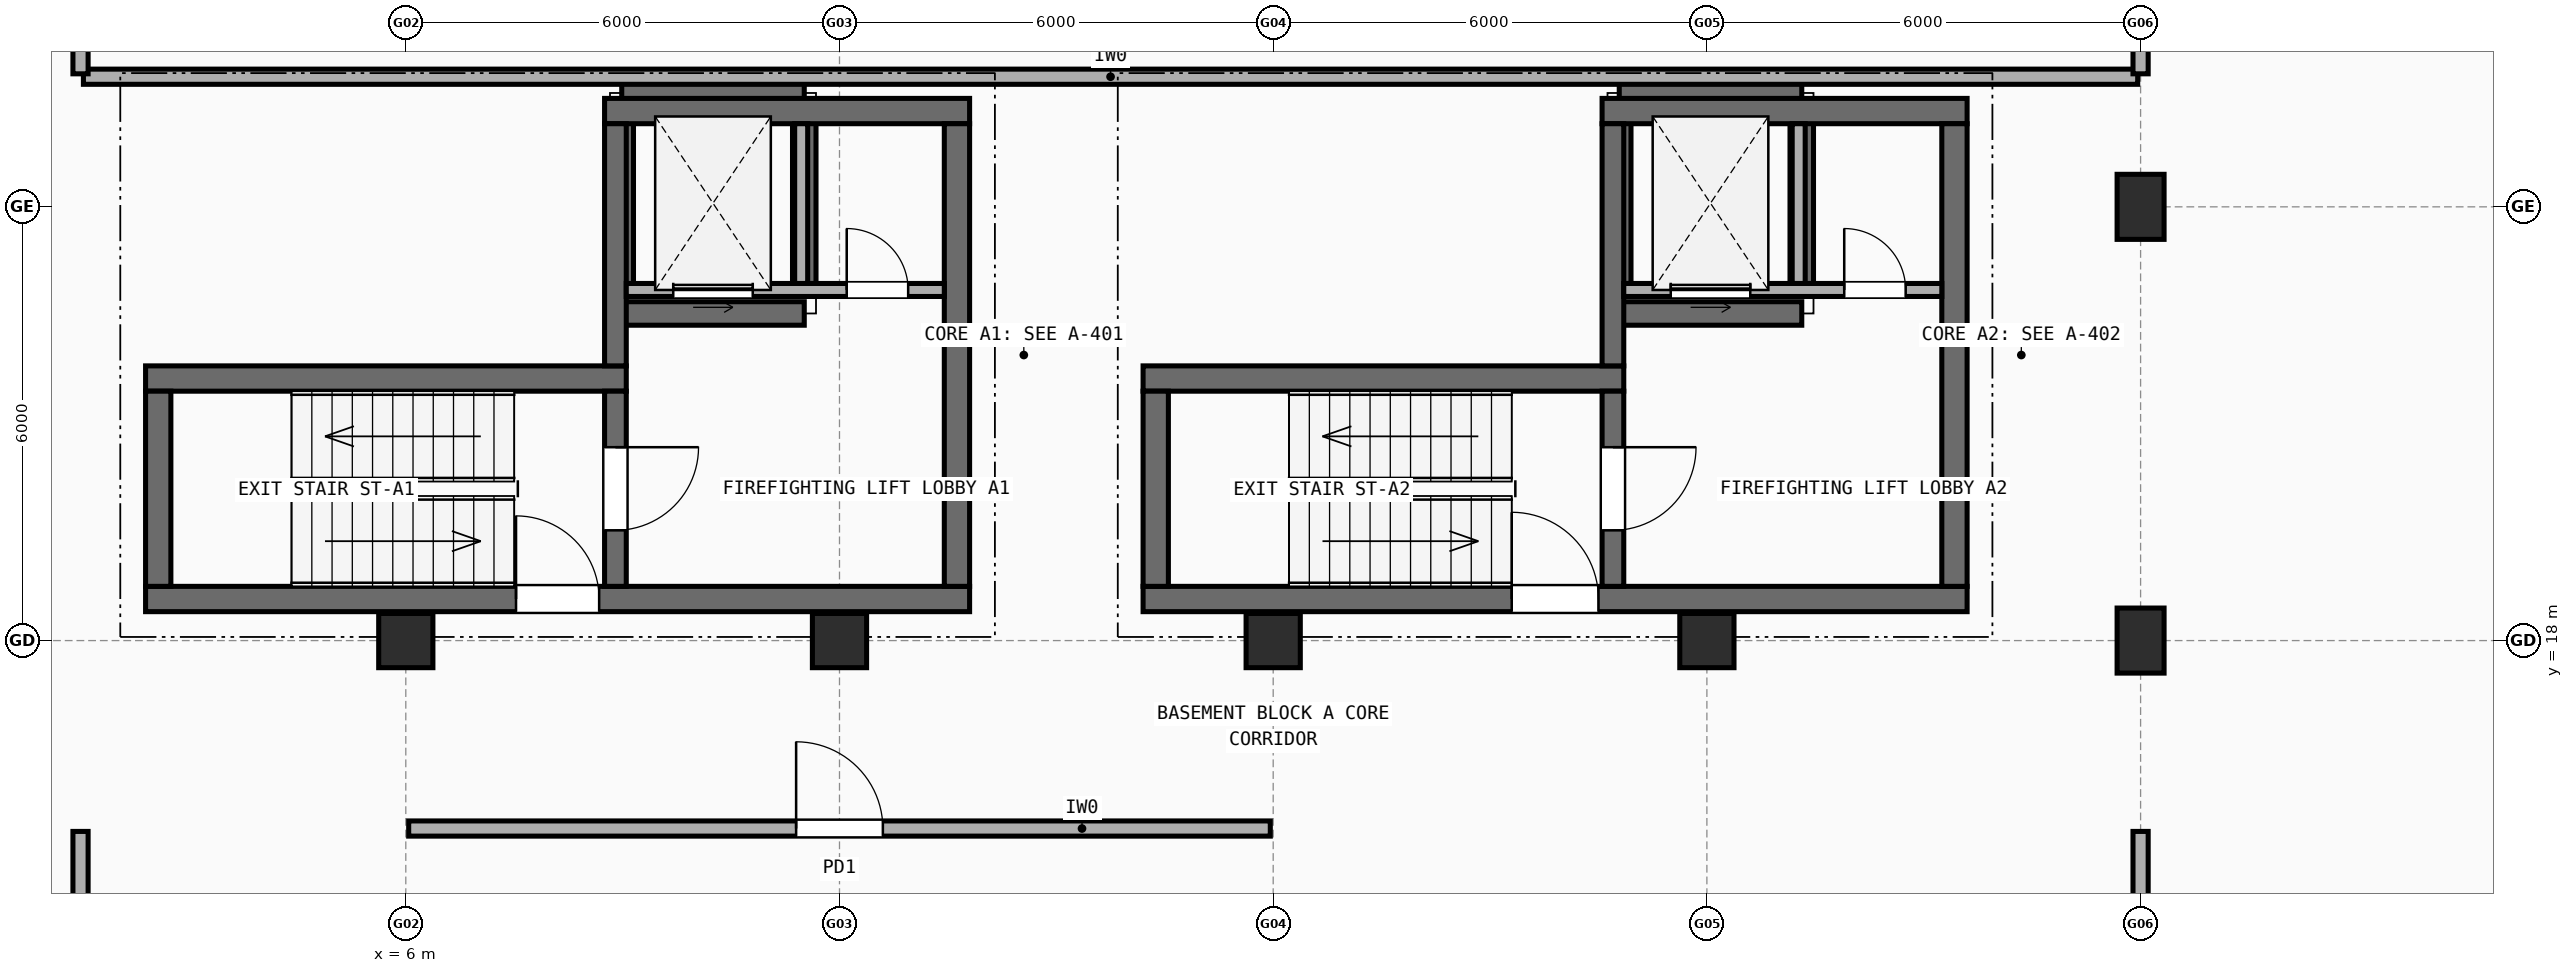
"""IFC4 building model, lengths in metres.
Left out: names, types, materials, properties, quantities, classifications, styles, units other than length and angle.
Written with IfcOpenShell. Run it as: python <this file> out.ifc"""

import sys

from ifc_helpers import new_model, si_unit, direction, frame, frame_2d, origin, origin_2d, place, context, subcontext, project, spatial, rectangle, extrude, element, fill, save


model = new_model("IFC4")
c1 = context("Model", 3, precision=1e-05, world=origin(), true_north=direction((0.0, 1.0)))
c2 = subcontext(c1, "Body", "Model", "MODEL_VIEW")
j1 = project(units=[si_unit("LENGTHUNIT", "METRE"), si_unit("PLANEANGLEUNIT", "RADIAN")], contexts=[c1])
p1 = place(None, origin())
s1 = spatial("IfcSite", under=j1, at=p1, CompositionType="ELEMENT")
p2 = place(p1, origin())
s2 = spatial("IfcBuilding", under=s1, at=p2, CompositionType="ELEMENT")
p3 = place(p2, frame((0.0, 0.0, -4.5)))
s3 = spatial("IfcBuildingStorey", under=s2, at=p3, CompositionType="ELEMENT", Elevation=-4.5)
p4 = place(p3, frame((8.988, 22.525, -1.1), z_axis=(0.0, 0.0, 1.0), x_axis=(1.0, 0.0, 0.0)))
e1 = element("IfcWall", 1, at=p4, inside=s3, PredefinedType="SHEAR", context=c2, shape_type="SweptSolid", body=[
    extrude(rectangle(XDim=2.525, YDim=0.325, at=frame_2d((1.262, 0.0))), origin(), (0.0, 0.0, 1.0), 1.1),
])
p5 = place(p3, frame((11.512, 22.85, -1.1), z_axis=(0.0, 0.0, 1.0), x_axis=(0.0, 1.0, 0.0)))
e2 = element("IfcWall", 2, at=p5, inside=s3, PredefinedType="SHEAR", context=c2, shape_type="SweptSolid", body=[
    extrude(rectangle(XDim=2.4, YDim=0.325, at=frame_2d((1.2, 0.0))), origin(), (0.0, 0.0, 1.0), 1.1),
])
p6 = place(p3, frame((11.512, 25.575, -1.1), z_axis=(0.0, 0.0, 1.0), x_axis=(-1.0, 0.0, 0.0)))
e3 = element("IfcWall", 3, at=p6, inside=s3, PredefinedType="SHEAR", context=c2, shape_type="SweptSolid", body=[
    extrude(rectangle(XDim=2.525, YDim=0.325, at=frame_2d((1.262, 0.0))), origin(), (0.0, 0.0, 1.0), 1.1),
])
p7 = place(p3, frame((8.988, 25.25, -1.1), z_axis=(0.0, 0.0, 1.0), x_axis=(0.0, -1.0, 0.0)))
e4 = element("IfcWall", 4, at=p7, inside=s3, PredefinedType="SHEAR", context=c2, shape_type="SweptSolid", body=[
    extrude(rectangle(XDim=2.4, YDim=0.325, at=frame_2d((1.2, 0.0))), origin(), (0.0, 0.0, 1.0), 1.1),
])
p8 = place(p3, frame((22.788, 22.525, -1.1), z_axis=(0.0, 0.0, 1.0), x_axis=(1.0, 0.0, 0.0)))
e5 = element("IfcWall", 5, at=p8, inside=s3, PredefinedType="SHEAR", context=c2, shape_type="SweptSolid", body=[
    extrude(rectangle(XDim=2.525, YDim=0.325, at=frame_2d((1.262, 0.0))), origin(), (0.0, 0.0, 1.0), 1.1),
])
p9 = place(p3, frame((25.312, 22.85, -1.1), z_axis=(0.0, 0.0, 1.0), x_axis=(0.0, 1.0, 0.0)))
e6 = element("IfcWall", 6, at=p9, inside=s3, PredefinedType="SHEAR", context=c2, shape_type="SweptSolid", body=[
    extrude(rectangle(XDim=2.4, YDim=0.325, at=frame_2d((1.2, 0.0))), origin(), (0.0, 0.0, 1.0), 1.1),
])
p10 = place(p3, frame((25.312, 25.575, -1.1), z_axis=(0.0, 0.0, 1.0), x_axis=(-1.0, 0.0, 0.0)))
e7 = element("IfcWall", 7, at=p10, inside=s3, PredefinedType="SHEAR", context=c2, shape_type="SweptSolid", body=[
    extrude(rectangle(XDim=2.525, YDim=0.325, at=frame_2d((1.262, 0.0))), origin(), (0.0, 0.0, 1.0), 1.1),
])
p11 = place(p3, frame((22.788, 25.25, -1.1), z_axis=(0.0, 0.0, 1.0), x_axis=(0.0, -1.0, 0.0)))
e8 = element("IfcWall", 8, at=p11, inside=s3, PredefinedType="SHEAR", context=c2, shape_type="SweptSolid", body=[
    extrude(rectangle(XDim=2.4, YDim=0.325, at=frame_2d((1.2, 0.0))), origin(), (0.0, 0.0, 1.0), 1.1),
])
for number, where, z_axis, x_axis in (
    (9, (6.0, 18.0, 0.0), (0.0, 0.0, 1.0), (1.0, 0.0, 0.0)),
    (10, (12.0, 18.0, 0.0), (0.0, 0.0, 1.0), (1.0, 0.0, 0.0)),
    (11, (18.0, 18.0, 0.0), (0.0, 0.0, 1.0), (1.0, 0.0, 0.0)),
    (12, (24.0, 18.0, 0.0), (0.0, 0.0, 1.0), (1.0, 0.0, 0.0)),
):
    element("IfcColumn", number, at=place(p3, frame(where, z_axis=z_axis, x_axis=x_axis)), inside=s3, PredefinedType="COLUMN", context=c2, shape_type="SweptSolid", body=[
        extrude(rectangle(XDim=0.75, YDim=0.75, at=origin_2d()), origin(), (0.0, 0.0, 1.0), 4.215),
    ])
for number, where, z_axis, x_axis in (
    (13, (30.0, 18.0, 0.0), (0.0, 0.0, 1.0), (1.0, 0.0, 0.0)),
    (14, (30.0, 24.0, 0.0), (0.0, 0.0, 1.0), (1.0, 0.0, 0.0)),
):
    element("IfcColumn", number, at=place(p3, frame(where, z_axis=z_axis, x_axis=x_axis)), inside=s3, PredefinedType="COLUMN", context=c2, shape_type="SweptSolid", body=[
        extrude(rectangle(XDim=0.65, YDim=0.9, at=origin_2d()), origin(), (0.0, 0.0, 1.0), 4.215),
    ])
p12 = place(p3, frame((2.4, 18.575, 0.0), z_axis=(0.0, 0.0, 1.0), x_axis=(1.0, 0.0, 0.0)))
e15 = element("IfcWall", 15, at=p12, inside=s3, PredefinedType="SHEAR", context=c2, shape_type="SweptSolid", body=[
    extrude(rectangle(XDim=11.4, YDim=0.35, at=frame_2d((5.7, 0.0))), origin(), (0.0, 0.0, 1.0), 4.215),
])
p13 = place(p12, frame((5.125, 0.0, 0.0)))
e16 = element("IfcOpeningElement", 16, at=p13, cuts=e15, PredefinedType="OPENING", context=c2, shape_type="SweptSolid", body=[
    extrude(rectangle(XDim=1.15, YDim=2.15, at=frame_2d((0.575, 1.075))), frame((0.0, 0.185, 0.0), z_axis=(0.0, -1.0, 0.0), x_axis=(1.0, 0.0, 0.0)), (0.0, 0.0, 1.0), 0.37),
])
p14 = place(p3, frame((9.05, 21.625, 0.0), z_axis=(0.0, 0.0, 1.0), x_axis=(-1.0, 0.0, 0.0)))
e17 = element("IfcWall", 17, at=p14, inside=s3, PredefinedType="SHEAR", context=c2, shape_type="SweptSolid", body=[
    extrude(rectangle(XDim=6.65, YDim=0.35, at=frame_2d((3.325, 0.0))), origin(), (0.0, 0.0, 1.0), 4.215),
])
p15 = place(p3, frame((2.575, 21.45, 0.0), z_axis=(0.0, 0.0, 1.0), x_axis=(0.0, -1.0, 0.0)))
e18 = element("IfcWall", 18, at=p15, inside=s3, PredefinedType="SHEAR", context=c2, shape_type="SweptSolid", body=[
    extrude(rectangle(XDim=2.7, YDim=0.35, at=frame_2d((1.35, 0.0))), origin(), (0.0, 0.0, 1.0), 4.215),
])
p16 = place(p3, frame((8.9, 18.75, 0.0), z_axis=(0.0, 0.0, 1.0), x_axis=(0.0, 1.0, 0.0)))
e19 = element("IfcWall", 19, at=p16, inside=s3, PredefinedType="SHEAR", context=c2, shape_type="SweptSolid", body=[
    extrude(rectangle(XDim=2.7, YDim=0.3, at=frame_2d((1.35, 0.0))), origin(), (0.0, 0.0, 1.0), 4.215),
])
p17 = place(p16, frame((0.775, 0.0, 0.0)))
e20 = element("IfcOpeningElement", 20, at=p17, cuts=e19, PredefinedType="OPENING", context=c2, shape_type="SweptSolid", body=[
    extrude(rectangle(XDim=1.15, YDim=2.15, at=frame_2d((0.575, 1.075))), frame((0.0, 0.16, 0.0), z_axis=(0.0, -1.0, 0.0), x_axis=(1.0, 0.0, 0.0)), (0.0, 0.0, 1.0), 0.32),
])
p18 = place(p3, frame((13.8, 25.325, 0.0), z_axis=(0.0, 0.0, 1.0), x_axis=(-1.0, 0.0, 0.0)))
e21 = element("IfcWall", 21, at=p18, inside=s3, PredefinedType="SHEAR", context=c2, shape_type="SweptSolid", body=[
    extrude(rectangle(XDim=5.05, YDim=0.35, at=frame_2d((2.525, 0.0))), origin(), (0.0, 0.0, 1.0), 4.215),
])
p19 = place(p3, frame((13.625, 18.75, 0.0), z_axis=(0.0, 0.0, 1.0), x_axis=(0.0, 1.0, 0.0)))
e22 = element("IfcWall", 22, at=p19, inside=s3, PredefinedType="SHEAR", context=c2, shape_type="SweptSolid", body=[
    extrude(rectangle(XDim=6.4, YDim=0.35, at=frame_2d((3.2, 0.0))), origin(), (0.0, 0.0, 1.0), 4.215),
])
p20 = place(p3, frame((8.9, 21.8, 0.0), z_axis=(0.0, 0.0, 1.0), x_axis=(0.0, 1.0, 0.0)))
e23 = element("IfcWall", 23, at=p20, inside=s3, PredefinedType="SHEAR", context=c2, shape_type="SweptSolid", body=[
    extrude(rectangle(XDim=3.35, YDim=0.3, at=frame_2d((1.675, 0.0))), origin(), (0.0, 0.0, 1.0), 4.215),
])
p21 = place(p3, frame((9.05, 22.85, 0.0), z_axis=(0.0, 0.0, 1.0), x_axis=(1.0, 0.0, 0.0)))
e24 = element("IfcWall", 24, at=p21, inside=s3, PredefinedType="SOLIDWALL", context=c2, shape_type="SweptSolid", body=[
    extrude(rectangle(XDim=4.4, YDim=0.18, at=frame_2d((2.2, 0.0))), origin(), (0.0, 0.0, 1.0), 4.215),
])
p22 = place(p21, frame((0.65, 0.0, 0.0)))
e25 = element("IfcOpeningElement", 25, at=p22, cuts=e24, PredefinedType="OPENING", context=c2, shape_type="SweptSolid", body=[
    extrude(rectangle(XDim=1.1, YDim=2.15, at=frame_2d((0.55, 1.075))), frame((0.0, 0.1, 0.0), z_axis=(0.0, -1.0, 0.0), x_axis=(1.0, 0.0, 0.0)), (0.0, 0.0, 1.0), 0.2),
])
p23 = place(p21, frame((3.05, 0.0, 0.0)))
e26 = element("IfcOpeningElement", 26, at=p23, cuts=e24, PredefinedType="OPENING", context=c2, shape_type="SweptSolid", body=[
    extrude(rectangle(XDim=0.85, YDim=2.1, at=frame_2d((0.425, 1.05))), frame((0.0, 0.1, 0.0), z_axis=(0.0, -1.0, 0.0), x_axis=(1.0, 0.0, 0.0)), (0.0, 0.0, 1.0), 0.2),
])
p24 = place(p3, frame((11.47, 22.94, 0.0), z_axis=(0.0, 0.0, 1.0), x_axis=(0.0, 1.0, 0.0)))
e27 = element("IfcWall", 27, at=p24, inside=s3, PredefinedType="SOLIDWALL", context=c2, shape_type="SweptSolid", body=[
    extrude(rectangle(XDim=2.21, YDim=0.18, at=frame_2d((1.105, 0.0))), origin(), (0.0, 0.0, 1.0), 4.215),
])
p25 = place(p3, frame((16.2, 18.575, 0.0), z_axis=(0.0, 0.0, 1.0), x_axis=(1.0, 0.0, 0.0)))
e28 = element("IfcWall", 28, at=p25, inside=s3, PredefinedType="SHEAR", context=c2, shape_type="SweptSolid", body=[
    extrude(rectangle(XDim=11.4, YDim=0.35, at=frame_2d((5.7, 0.0))), origin(), (0.0, 0.0, 1.0), 4.215),
])
p26 = place(p25, frame((5.1, 0.0, 0.0)))
e29 = element("IfcOpeningElement", 29, at=p26, cuts=e28, PredefinedType="OPENING", context=c2, shape_type="SweptSolid", body=[
    extrude(rectangle(XDim=1.2, YDim=2.15, at=frame_2d((0.6, 1.075))), frame((0.0, 0.185, 0.0), z_axis=(0.0, -1.0, 0.0), x_axis=(1.0, 0.0, 0.0)), (0.0, 0.0, 1.0), 0.37),
])
p27 = place(p3, frame((22.85, 21.625, 0.0), z_axis=(0.0, 0.0, 1.0), x_axis=(-1.0, 0.0, 0.0)))
e30 = element("IfcWall", 30, at=p27, inside=s3, PredefinedType="SHEAR", context=c2, shape_type="SweptSolid", body=[
    extrude(rectangle(XDim=6.65, YDim=0.35, at=frame_2d((3.325, 0.0))), origin(), (0.0, 0.0, 1.0), 4.215),
])
p28 = place(p3, frame((16.375, 21.45, 0.0), z_axis=(0.0, 0.0, 1.0), x_axis=(0.0, -1.0, 0.0)))
e31 = element("IfcWall", 31, at=p28, inside=s3, PredefinedType="SHEAR", context=c2, shape_type="SweptSolid", body=[
    extrude(rectangle(XDim=2.7, YDim=0.35, at=frame_2d((1.35, 0.0))), origin(), (0.0, 0.0, 1.0), 4.215),
])
p29 = place(p3, frame((22.7, 18.75, 0.0), z_axis=(0.0, 0.0, 1.0), x_axis=(0.0, 1.0, 0.0)))
e32 = element("IfcWall", 32, at=p29, inside=s3, PredefinedType="SHEAR", context=c2, shape_type="SweptSolid", body=[
    extrude(rectangle(XDim=2.7, YDim=0.3, at=frame_2d((1.35, 0.0))), origin(), (0.0, 0.0, 1.0), 4.215),
])
p30 = place(p29, frame((0.775, 0.0, 0.0)))
e33 = element("IfcOpeningElement", 33, at=p30, cuts=e32, PredefinedType="OPENING", context=c2, shape_type="SweptSolid", body=[
    extrude(rectangle(XDim=1.15, YDim=2.15, at=frame_2d((0.575, 1.075))), frame((0.0, 0.16, 0.0), z_axis=(0.0, -1.0, 0.0), x_axis=(1.0, 0.0, 0.0)), (0.0, 0.0, 1.0), 0.32),
])
p31 = place(p3, frame((27.6, 25.325, 0.0), z_axis=(0.0, 0.0, 1.0), x_axis=(-1.0, 0.0, 0.0)))
e34 = element("IfcWall", 34, at=p31, inside=s3, PredefinedType="SHEAR", context=c2, shape_type="SweptSolid", body=[
    extrude(rectangle(XDim=5.05, YDim=0.35, at=frame_2d((2.525, 0.0))), origin(), (0.0, 0.0, 1.0), 4.215),
])
p32 = place(p3, frame((27.425, 18.75, 0.0), z_axis=(0.0, 0.0, 1.0), x_axis=(0.0, 1.0, 0.0)))
e35 = element("IfcWall", 35, at=p32, inside=s3, PredefinedType="SHEAR", context=c2, shape_type="SweptSolid", body=[
    extrude(rectangle(XDim=6.4, YDim=0.35, at=frame_2d((3.2, 0.0))), origin(), (0.0, 0.0, 1.0), 4.215),
])
p33 = place(p3, frame((22.7, 21.8, 0.0), z_axis=(0.0, 0.0, 1.0), x_axis=(0.0, 1.0, 0.0)))
e36 = element("IfcWall", 36, at=p33, inside=s3, PredefinedType="SHEAR", context=c2, shape_type="SweptSolid", body=[
    extrude(rectangle(XDim=3.35, YDim=0.3, at=frame_2d((1.675, 0.0))), origin(), (0.0, 0.0, 1.0), 4.215),
])
p34 = place(p3, frame((22.85, 22.85, 0.0), z_axis=(0.0, 0.0, 1.0), x_axis=(1.0, 0.0, 0.0)))
e37 = element("IfcWall", 37, at=p34, inside=s3, PredefinedType="SOLIDWALL", context=c2, shape_type="SweptSolid", body=[
    extrude(rectangle(XDim=4.4, YDim=0.18, at=frame_2d((2.2, 0.0))), origin(), (0.0, 0.0, 1.0), 4.215),
])
p35 = place(p34, frame((0.65, 0.0, 0.0)))
e38 = element("IfcOpeningElement", 38, at=p35, cuts=e37, PredefinedType="OPENING", context=c2, shape_type="SweptSolid", body=[
    extrude(rectangle(XDim=1.1, YDim=2.15, at=frame_2d((0.55, 1.075))), frame((0.0, 0.1, 0.0), z_axis=(0.0, -1.0, 0.0), x_axis=(1.0, 0.0, 0.0)), (0.0, 0.0, 1.0), 0.2),
])
p36 = place(p34, frame((3.05, 0.0, 0.0)))
e39 = element("IfcOpeningElement", 39, at=p36, cuts=e37, PredefinedType="OPENING", context=c2, shape_type="SweptSolid", body=[
    extrude(rectangle(XDim=0.85, YDim=2.1, at=frame_2d((0.425, 1.05))), frame((0.0, 0.1, 0.0), z_axis=(0.0, -1.0, 0.0), x_axis=(1.0, 0.0, 0.0)), (0.0, 0.0, 1.0), 0.2),
])
p37 = place(p3, frame((25.27, 22.94, 0.0), z_axis=(0.0, 0.0, 1.0), x_axis=(0.0, 1.0, 0.0)))
e40 = element("IfcWall", 40, at=p37, inside=s3, PredefinedType="SOLIDWALL", context=c2, shape_type="SweptSolid", body=[
    extrude(rectangle(XDim=2.21, YDim=0.18, at=frame_2d((1.105, 0.0))), origin(), (0.0, 0.0, 1.0), 4.215),
])
p38 = place(p3, frame((6.04, 15.4, 0.0), z_axis=(0.0, 0.0, 1.0), x_axis=(1.0, 0.0, 0.0)))
e41 = element("IfcWall", 41, at=p38, inside=s3, PredefinedType="SOLIDWALL", context=c2, shape_type="SweptSolid", body=[
    extrude(rectangle(XDim=11.92, YDim=0.21, at=frame_2d((5.96, 0.0))), origin(), (0.0, 0.0, 1.0), 3.497),
])
p39 = place(p38, frame((5.36, 0.0, 0.0)))
e42 = element("IfcOpeningElement", 42, at=p39, cuts=e41, PredefinedType="OPENING", context=c2, shape_type="SweptSolid", body=[
    extrude(rectangle(XDim=1.2, YDim=2.15, at=frame_2d((0.6, 1.075))), frame((0.0, 0.115, 0.0), z_axis=(0.0, -1.0, 0.0), x_axis=(1.0, 0.0, 0.0)), (0.0, 0.0, 1.0), 0.23),
])
p40 = place(p3, frame((30.0, 1.54, 0.0), z_axis=(0.0, 0.0, 1.0), x_axis=(0.0, 1.0, 0.0)))
e43 = element("IfcWall", 43, at=p40, inside=s3, PredefinedType="SOLIDWALL", context=c2, shape_type="SweptSolid", body=[
    extrude(rectangle(XDim=13.82, YDim=0.21, at=frame_2d((6.91, 0.0))), origin(), (0.0, 0.0, 1.0), 3.597),
])
p41 = place(p3, frame((1.5, 15.36, 0.0), z_axis=(0.0, 0.0, 1.0), x_axis=(0.0, -1.0, 0.0)))
e44 = element("IfcWall", 44, at=p41, inside=s3, PredefinedType="SOLIDWALL", context=c2, shape_type="SweptSolid", body=[
    extrude(rectangle(XDim=13.82, YDim=0.21, at=frame_2d((6.91, 0.0))), origin(), (0.0, 0.0, 1.0), 3.497),
])
p42 = place(p3, frame((1.54, 25.8, 0.0), z_axis=(0.0, 0.0, 1.0), x_axis=(1.0, 0.0, 0.0)))
e45 = element("IfcWall", 45, at=p42, inside=s3, PredefinedType="SOLIDWALL", context=c2, shape_type="SweptSolid", body=[
    extrude(rectangle(XDim=28.42, YDim=0.21, at=frame_2d((14.21, 0.0))), origin(), (0.0, 0.0, 1.0), 2.897),
])
p43 = place(p3, frame((30.0, 25.84, 0.0), z_axis=(0.0, 0.0, 1.0), x_axis=(0.0, 1.0, 0.0)))
e46 = element("IfcWall", 46, at=p43, inside=s3, PredefinedType="SOLIDWALL", context=c2, shape_type="SweptSolid", body=[
    extrude(rectangle(XDim=15.8, YDim=0.21, at=frame_2d((7.9, 0.0))), origin(), (0.0, 0.0, 1.0), 3.597),
])
p44 = place(p3, frame((1.5, 41.96, 0.0), z_axis=(0.0, 0.0, 1.0), x_axis=(0.0, -1.0, 0.0)))
e47 = element("IfcWall", 47, at=p44, inside=s3, PredefinedType="SOLIDWALL", context=c2, shape_type="SweptSolid", body=[
    extrude(rectangle(XDim=16.12, YDim=0.21, at=frame_2d((8.06, 0.0))), origin(), (0.0, 0.0, 1.0), 3.447),
])
p45 = place(p13, origin())
e48 = element("IfcDoor", 48, at=p45, inside=s3, OperationType="SINGLE_SWING_LEFT", PredefinedType="DOOR", context=c2, shape_type="SweptSolid", body=[
    extrude(rectangle(XDim=1.15, YDim=2.15, at=frame_2d((0.575, 1.075))), frame((0.0, 0.025, 0.0), z_axis=(0.0, -1.0, 0.0), x_axis=(1.0, 0.0, 0.0)), (0.0, 0.0, 1.0), 0.05),
])
fill(e16, e48)
p46 = place(p17, origin())
e49 = element("IfcDoor", 49, at=p46, inside=s3, OperationType="SINGLE_SWING_RIGHT", PredefinedType="DOOR", context=c2, shape_type="SweptSolid", body=[
    extrude(rectangle(XDim=1.15, YDim=2.15, at=frame_2d((0.575, 1.075))), frame((0.0, 0.025, 0.0), z_axis=(0.0, -1.0, 0.0), x_axis=(1.0, 0.0, 0.0)), (0.0, 0.0, 1.0), 0.05),
])
fill(e20, e49)
p47 = place(p22, origin())
e50 = element("IfcDoor", 50, at=p47, inside=s3, OperationType="SLIDING_TO_LEFT", PredefinedType="DOOR", context=c2, shape_type="SweptSolid", body=[
    extrude(rectangle(XDim=1.1, YDim=2.15, at=frame_2d((0.55, 1.075))), frame((0.0, 0.025, 0.0), z_axis=(0.0, -1.0, 0.0), x_axis=(1.0, 0.0, 0.0)), (0.0, 0.0, 1.0), 0.05),
])
fill(e25, e50)
p48 = place(p23, frame((0.85, 0.0, 0.0), z_axis=(0.0, 0.0, 1.0), x_axis=(-1.0, 0.0, 0.0)))
e51 = element("IfcDoor", 51, at=p48, inside=s3, OperationType="SINGLE_SWING_LEFT", PredefinedType="DOOR", context=c2, shape_type="SweptSolid", body=[
    extrude(rectangle(XDim=0.85, YDim=2.1, at=frame_2d((0.425, 1.05))), frame((0.0, 0.025, 0.0), z_axis=(0.0, -1.0, 0.0), x_axis=(1.0, 0.0, 0.0)), (0.0, 0.0, 1.0), 0.05),
])
fill(e26, e51)
p49 = place(p26, origin())
e52 = element("IfcDoor", 52, at=p49, inside=s3, OperationType="SINGLE_SWING_LEFT", PredefinedType="DOOR", context=c2, shape_type="SweptSolid", body=[
    extrude(rectangle(XDim=1.2, YDim=2.15, at=frame_2d((0.6, 1.075))), frame((0.0, 0.025, 0.0), z_axis=(0.0, -1.0, 0.0), x_axis=(1.0, 0.0, 0.0)), (0.0, 0.0, 1.0), 0.05),
])
fill(e29, e52)
p50 = place(p30, origin())
e53 = element("IfcDoor", 53, at=p50, inside=s3, OperationType="SINGLE_SWING_RIGHT", PredefinedType="DOOR", context=c2, shape_type="SweptSolid", body=[
    extrude(rectangle(XDim=1.15, YDim=2.15, at=frame_2d((0.575, 1.075))), frame((0.0, 0.025, 0.0), z_axis=(0.0, -1.0, 0.0), x_axis=(1.0, 0.0, 0.0)), (0.0, 0.0, 1.0), 0.05),
])
fill(e33, e53)
p51 = place(p35, origin())
e54 = element("IfcDoor", 54, at=p51, inside=s3, OperationType="SLIDING_TO_LEFT", PredefinedType="DOOR", context=c2, shape_type="SweptSolid", body=[
    extrude(rectangle(XDim=1.1, YDim=2.15, at=frame_2d((0.55, 1.075))), frame((0.0, 0.025, 0.0), z_axis=(0.0, -1.0, 0.0), x_axis=(1.0, 0.0, 0.0)), (0.0, 0.0, 1.0), 0.05),
])
fill(e38, e54)
p52 = place(p36, frame((0.85, 0.0, 0.0), z_axis=(0.0, 0.0, 1.0), x_axis=(-1.0, 0.0, 0.0)))
e55 = element("IfcDoor", 55, at=p52, inside=s3, OperationType="SINGLE_SWING_LEFT", PredefinedType="DOOR", context=c2, shape_type="SweptSolid", body=[
    extrude(rectangle(XDim=0.85, YDim=2.1, at=frame_2d((0.425, 1.05))), frame((0.0, 0.025, 0.0), z_axis=(0.0, -1.0, 0.0), x_axis=(1.0, 0.0, 0.0)), (0.0, 0.0, 1.0), 0.05),
])
fill(e39, e55)
p53 = place(p39, origin())
e56 = element("IfcDoor", 56, at=p53, inside=s3, OperationType="SINGLE_SWING_LEFT", PredefinedType="DOOR", context=c2, shape_type="SweptSolid", body=[
    extrude(rectangle(XDim=1.2, YDim=2.15, at=frame_2d((0.6, 1.075))), frame((0.0, 0.025, 0.0), z_axis=(0.0, -1.0, 0.0), x_axis=(1.0, 0.0, 0.0)), (0.0, 0.0, 1.0), 0.05),
])
fill(e42, e56)
save(model, sys.argv[1])
